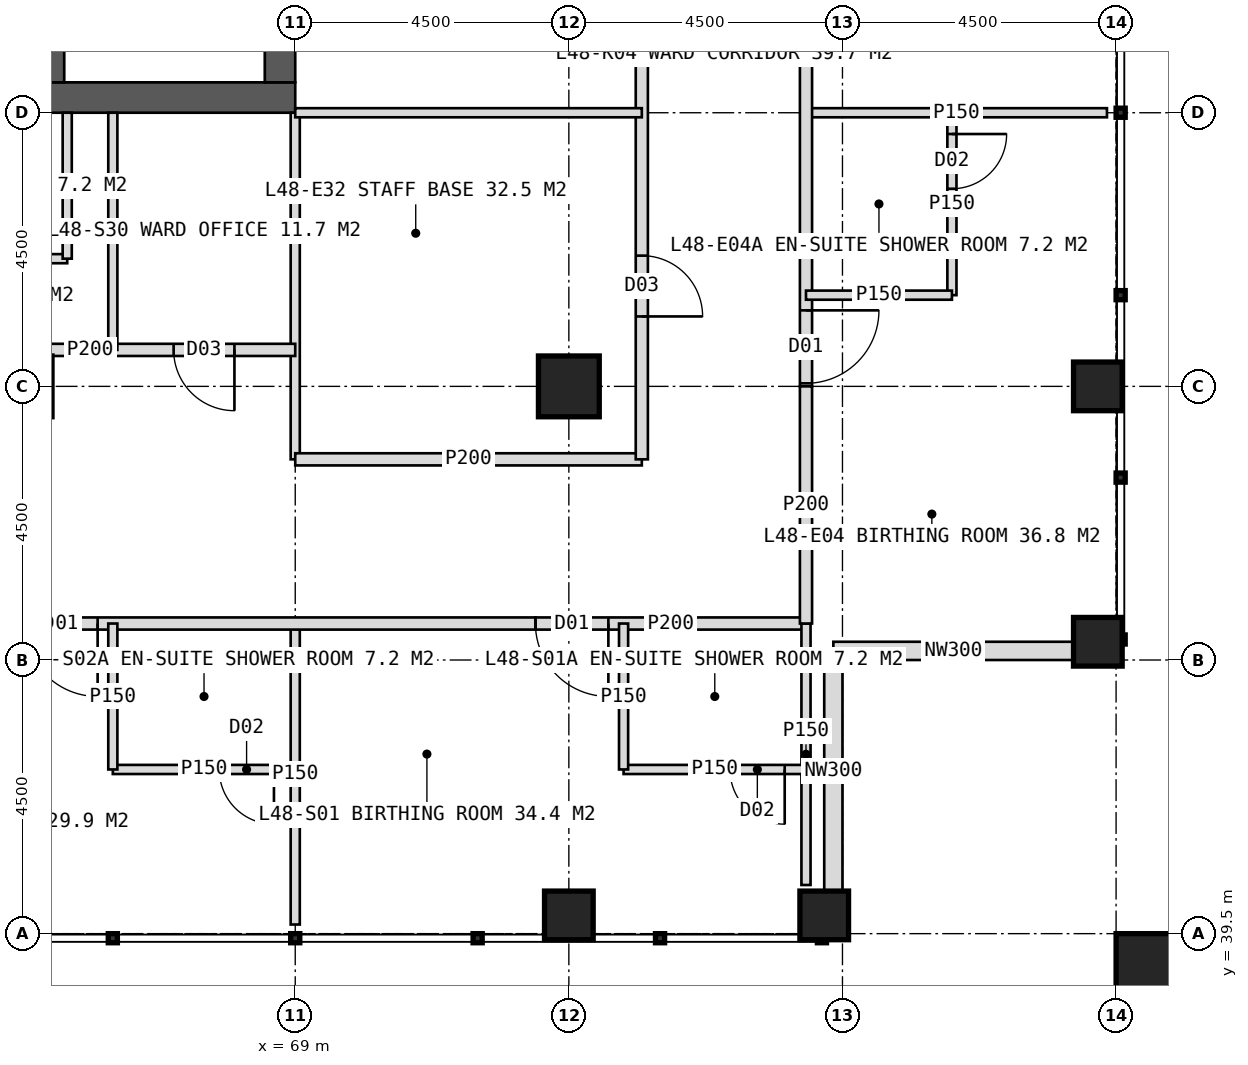
"""IFC4 building model, lengths in metres.
Left out: names, types, materials, properties, quantities, classifications, styles, units other than length and angle.
Written with IfcOpenShell. Run it as: python <this file> out.ifc"""

import sys

from ifc_helpers import new_model, si_unit, direction, frame, frame_2d, origin, origin_2d, place, context, subcontext, project, spatial, rectangle, hollow_rectangle, extrude, element, fill, save


model = new_model("IFC4")
c1 = context("Model", 3, precision=1e-05, world=origin(), true_north=direction((0.0, 1.0)))
c2 = subcontext(c1, "Body", "Model", "MODEL_VIEW")
j1 = project(units=[si_unit("LENGTHUNIT", "METRE"), si_unit("PLANEANGLEUNIT", "RADIAN")], contexts=[c1])
p1 = place(None, origin())
s1 = spatial("IfcSite", under=j1, at=p1, CompositionType="ELEMENT")
p2 = place(p1, origin())
s2 = spatial("IfcBuilding", under=s1, at=p2, CompositionType="ELEMENT")
p3 = place(p2, frame((0.0, 0.0, 201.0)))
s3 = spatial("IfcBuildingStorey", under=s2, at=p3, CompositionType="ELEMENT", Elevation=201.0)
p4 = place(p3, frame((51.0, 53.25, 0.0), z_axis=(0.0, 0.0, 1.0), x_axis=(1.0, 0.0, 0.0)))
e1 = element("IfcWall", 1, at=p4, inside=s3, PredefinedType="SHEAR", context=c2, shape_type="SweptSolid", body=[
    extrude(rectangle(XDim=18.0, YDim=0.5, at=frame_2d((9.0, 0.0))), origin(), (0.0, 0.0, 1.0), 4.0),
])
p5 = place(p4, frame((8.1, 0.0, 0.0)))
e2 = element("IfcOpeningElement", 2, at=p5, cuts=e1, PredefinedType="OPENING", context=c2, shape_type="SweptSolid", body=[
    extrude(rectangle(XDim=1.8, YDim=2.2, at=frame_2d((0.9, 1.1))), frame((0.0, 0.26, 0.0), z_axis=(0.0, -1.0, 0.0), x_axis=(1.0, 0.0, 0.0)), (0.0, 0.0, 1.0), 0.52),
])
p6 = place(p3, frame((68.75, 53.5, 0.0), z_axis=(0.0, 0.0, 1.0), x_axis=(0.0, 1.0, 0.0)))
e3 = element("IfcWall", 3, at=p6, inside=s3, PredefinedType="SHEAR", context=c2, shape_type="SweptSolid", body=[
    extrude(rectangle(XDim=17.0, YDim=0.5, at=frame_2d((8.5, 0.0))), origin(), (0.0, 0.0, 1.0), 4.0),
])
p7 = place(p6, frame((9.6, 0.0, 0.0)))
e4 = element("IfcOpeningElement", 4, at=p7, cuts=e3, PredefinedType="OPENING", context=c2, shape_type="SweptSolid", body=[
    extrude(rectangle(XDim=1.5, YDim=2.2, at=frame_2d((0.75, 1.1))), frame((0.0, 0.26, 0.0), z_axis=(0.0, -1.0, 0.0), x_axis=(1.0, 0.0, 0.0)), (0.0, 0.0, 1.0), 0.52),
])
p8 = place(p3, frame((65.05, 53.5, 0.0), z_axis=(0.0, 0.0, 1.0), x_axis=(0.0, 1.0, 0.0)))
e5 = element("IfcWall", 5, at=p8, inside=s3, PredefinedType="SHEAR", context=c2, shape_type="SweptSolid", body=[
    extrude(rectangle(XDim=17.0, YDim=0.3, at=frame_2d((8.5, 0.0))), origin(), (0.0, 0.0, 1.0), 4.0),
])
p9 = place(p3, frame((73.5, 48.5, 0.0), z_axis=(0.0, 0.0, 1.0), x_axis=(1.0, 0.0, 0.0)))
e6 = element("IfcColumn", 6, at=p9, inside=s3, PredefinedType="COLUMN", context=c2, shape_type="SweptSolid", body=[
    extrude(hollow_rectangle(XDim=1.0, YDim=1.0, WallThickness=0.1, at=origin_2d()), origin(), (0.0, 0.0, 1.0), 4.0),
])
for number, where, z_axis, x_axis in (
    (7, (82.2, 44.3, 0.0), (0.0, 0.0, 1.0), (1.0, 0.0, 0.0)),
    (8, (82.2, 48.5, 0.0), (0.0, 0.0, 1.0), (1.0, 0.0, 0.0)),
    (9, (73.5, 39.8, 0.0), (0.0, 0.0, 1.0), (1.0, 0.0, 0.0)),
    (10, (77.7, 39.8, 0.0), (0.0, 0.0, 1.0), (1.0, 0.0, 0.0)),
):
    element("IfcColumn", number, at=place(p3, frame(where, z_axis=z_axis, x_axis=x_axis)), inside=s3, PredefinedType="COLUMN", context=c2, shape_type="SweptSolid", body=[
        extrude(hollow_rectangle(XDim=0.8, YDim=0.8, WallThickness=0.08, at=origin_2d()), origin(), (0.0, 0.0, 1.0), 4.0),
    ])
p10 = place(p3, frame((83.1, 38.9, 0.0), z_axis=(0.0, 0.0, 1.0), x_axis=(1.0, 0.0, 0.0)))
e11 = element("IfcColumn", 11, at=p10, inside=s3, PredefinedType="COLUMN", context=c2, shape_type="SweptSolid", body=[
    extrude(hollow_rectangle(XDim=1.2, YDim=1.2, WallThickness=0.07, at=origin_2d()), origin(), (0.0, 0.0, 1.0), 4.0),
])
for number, where, z_axis, x_axis in (
    (12, (81.8, 44.15, 0.0), (0.0, 0.0, 1.0), (-1.0, 0.0, 0.0)),
    (13, (77.85, 44.15, 0.0), (0.0, 0.0, 1.0), (0.0, -1.0, 0.0)),
):
    element("IfcWall", number, at=place(p3, frame(where, z_axis=z_axis, x_axis=x_axis)), inside=s3, PredefinedType="ELEMENTEDWALL", context=c2, shape_type="SweptSolid", body=[
        extrude(rectangle(XDim=3.95, YDim=0.3, at=frame_2d((1.975, 0.0))), origin(), (0.0, 0.0, 1.0), 2.85),
    ])
p11 = place(p3, frame((69.0, 44.6, 0.0), z_axis=(0.0, 0.0, 1.0), x_axis=(0.0, -1.0, 0.0)))
e14 = element("IfcWall", 14, at=p11, inside=s3, PredefinedType="PARTITIONING", context=c2, shape_type="SweptSolid", body=[
    extrude(rectangle(XDim=4.95, YDim=0.15, at=frame_2d((2.475, 0.0))), origin(), (0.0, 0.0, 1.0), 3.75),
])
p12 = place(p3, frame((77.4, 44.6, 0.0), z_axis=(0.0, 0.0, 1.0), x_axis=(-1.0, 0.0, 0.0)))
e15 = element("IfcWall", 15, at=p12, inside=s3, PredefinedType="PARTITIONING", context=c2, shape_type="SweptSolid", body=[
    extrude(rectangle(XDim=4.45, YDim=0.2, at=frame_2d((2.225, 0.0))), origin(), (0.0, 0.0, 1.0), 2.85),
])
p13 = place(p12, frame((3.25, 0.0, 0.0)))
e16 = element("IfcOpeningElement", 16, at=p13, cuts=e15, PredefinedType="OPENING", context=c2, shape_type="SweptSolid", body=[
    extrude(rectangle(XDim=1.2, YDim=2.2, at=frame_2d((0.6, 1.1))), frame((0.0, 0.11, 0.0), z_axis=(0.0, -1.0, 0.0), x_axis=(1.0, 0.0, 0.0)), (0.0, 0.0, 1.0), 0.22),
])
p14 = place(p3, frame((72.95, 44.6, 0.0), z_axis=(0.0, 0.0, 1.0), x_axis=(-1.0, 0.0, 0.0)))
e17 = element("IfcWall", 17, at=p14, inside=s3, PredefinedType="PARTITIONING", context=c2, shape_type="SweptSolid", body=[
    extrude(rectangle(XDim=26.45, YDim=0.2, at=frame_2d((13.225, 0.0))), origin(), (0.0, 0.0, 1.0), 3.75),
])
p15 = place(p14, frame((7.2, 0.0, 0.0)))
e18 = element("IfcOpeningElement", 18, at=p15, cuts=e17, PredefinedType="OPENING", context=c2, shape_type="SweptSolid", body=[
    extrude(rectangle(XDim=1.2, YDim=2.2, at=frame_2d((0.6, 1.1))), frame((0.0, 0.11, 0.0), z_axis=(0.0, -1.0, 0.0), x_axis=(1.0, 0.0, 0.0)), (0.0, 0.0, 1.0), 0.22),
])
p16 = place(p14, frame((14.7, 0.0, 0.0)))
e19 = element("IfcOpeningElement", 19, at=p16, cuts=e17, PredefinedType="OPENING", context=c2, shape_type="SweptSolid", body=[
    extrude(rectangle(XDim=1.2, YDim=2.2, at=frame_2d((0.6, 1.1))), frame((0.0, 0.11, 0.0), z_axis=(0.0, -1.0, 0.0), x_axis=(1.0, 0.0, 0.0)), (0.0, 0.0, 1.0), 0.22),
])
p17 = place(p14, frame((22.2, 0.0, 0.0)))
e20 = element("IfcOpeningElement", 20, at=p17, cuts=e17, PredefinedType="OPENING", context=c2, shape_type="SweptSolid", body=[
    extrude(rectangle(XDim=1.2, YDim=2.2, at=frame_2d((0.6, 1.1))), frame((0.0, 0.11, 0.0), z_axis=(0.0, -1.0, 0.0), x_axis=(1.0, 0.0, 0.0)), (0.0, 0.0, 1.0), 0.22),
])
p18 = place(p3, frame((77.4, 44.6, 0.0), z_axis=(0.0, 0.0, 1.0), x_axis=(0.0, -1.0, 0.0)))
e21 = element("IfcWall", 21, at=p18, inside=s3, PredefinedType="PARTITIONING", context=c2, shape_type="SweptSolid", body=[
    extrude(rectangle(XDim=4.3, YDim=0.15, at=frame_2d((2.15, 0.0))), origin(), (0.0, 0.0, 1.0), 2.85),
])
p19 = place(p3, frame((77.4, 42.2, 0.0), z_axis=(0.0, 0.0, 1.0), x_axis=(-1.0, 0.0, 0.0)))
e22 = element("IfcWall", 22, at=p19, inside=s3, PredefinedType="PARTITIONING", context=c2, shape_type="SweptSolid", body=[
    extrude(rectangle(XDim=3.0, YDim=0.15, at=frame_2d((1.5, 0.0))), origin(), (0.0, 0.0, 1.0), 3.75),
])
p20 = place(p19, frame((0.35, 0.0, 0.0)))
e23 = element("IfcOpeningElement", 23, at=p20, cuts=e22, PredefinedType="OPENING", context=c2, shape_type="SweptSolid", body=[
    extrude(rectangle(XDim=0.9, YDim=2.1, at=frame_2d((0.45, 1.05))), frame((0.0, 0.085, 0.0), z_axis=(0.0, -1.0, 0.0), x_axis=(1.0, 0.0, 0.0)), (0.0, 0.0, 1.0), 0.17),
])
p21 = place(p3, frame((74.4, 44.6, 0.0), z_axis=(0.0, 0.0, 1.0), x_axis=(0.0, -1.0, 0.0)))
e24 = element("IfcWall", 24, at=p21, inside=s3, PredefinedType="PARTITIONING", context=c2, shape_type="SweptSolid", body=[
    extrude(rectangle(XDim=2.4, YDim=0.15, at=frame_2d((1.2, 0.0))), origin(), (0.0, 0.0, 1.0), 3.75),
])
p22 = place(p3, frame((69.0, 42.2, 0.0), z_axis=(0.0, 0.0, 1.0), x_axis=(-1.0, 0.0, 0.0)))
e25 = element("IfcWall", 25, at=p22, inside=s3, PredefinedType="PARTITIONING", context=c2, shape_type="SweptSolid", body=[
    extrude(rectangle(XDim=3.0, YDim=0.15, at=frame_2d((1.5, 0.0))), origin(), (0.0, 0.0, 1.0), 3.75),
])
p23 = place(p22, frame((0.35, 0.0, 0.0)))
e26 = element("IfcOpeningElement", 26, at=p23, cuts=e25, PredefinedType="OPENING", context=c2, shape_type="SweptSolid", body=[
    extrude(rectangle(XDim=0.9, YDim=2.1, at=frame_2d((0.45, 1.05))), frame((0.0, 0.085, 0.0), z_axis=(0.0, -1.0, 0.0), x_axis=(1.0, 0.0, 0.0)), (0.0, 0.0, 1.0), 0.17),
])
p24 = place(p3, frame((66.0, 44.6, 0.0), z_axis=(0.0, 0.0, 1.0), x_axis=(0.0, -1.0, 0.0)))
e27 = element("IfcWall", 27, at=p24, inside=s3, PredefinedType="PARTITIONING", context=c2, shape_type="SweptSolid", body=[
    extrude(rectangle(XDim=2.4, YDim=0.15, at=frame_2d((1.2, 0.0))), origin(), (0.0, 0.0, 1.0), 3.75),
])
p25 = place(p3, frame((69.0, 53.0, 0.0), z_axis=(0.0, 0.0, 1.0), x_axis=(0.0, -1.0, 0.0)))
e28 = element("IfcWall", 28, at=p25, inside=s3, PredefinedType="PARTITIONING", context=c2, shape_type="SweptSolid", body=[
    extrude(rectangle(XDim=5.7, YDim=0.15, at=frame_2d((2.85, 0.0))), origin(), (0.0, 0.0, 1.0), 3.75),
])
p26 = place(p3, frame((74.7, 47.3, 0.0), z_axis=(0.0, 0.0, 1.0), x_axis=(-1.0, 0.0, 0.0)))
e29 = element("IfcWall", 29, at=p26, inside=s3, PredefinedType="PARTITIONING", context=c2, shape_type="SweptSolid", body=[
    extrude(rectangle(XDim=5.7, YDim=0.2, at=frame_2d((2.85, 0.0))), origin(), (0.0, 0.0, 1.0), 3.75),
])
p27 = place(p3, frame((69.0, 49.1, 0.0), z_axis=(0.0, 0.0, 1.0), x_axis=(-1.0, 0.0, 0.0)))
e30 = element("IfcWall", 30, at=p27, inside=s3, PredefinedType="PARTITIONING", context=c2, shape_type="SweptSolid", body=[
    extrude(rectangle(XDim=6.75, YDim=0.2, at=frame_2d((3.375, 0.0))), origin(), (0.0, 0.0, 1.0), 3.75),
])
p28 = place(p27, frame((1.0, 0.0, 0.0)))
e31 = element("IfcOpeningElement", 31, at=p28, cuts=e30, PredefinedType="OPENING", context=c2, shape_type="SweptSolid", body=[
    extrude(rectangle(XDim=1.0, YDim=2.1, at=frame_2d((0.5, 1.05))), frame((0.0, 0.11, 0.0), z_axis=(0.0, -1.0, 0.0), x_axis=(1.0, 0.0, 0.0)), (0.0, 0.0, 1.0), 0.22),
])
p29 = place(p27, frame((5.425, 0.0, 0.0)))
e32 = element("IfcOpeningElement", 32, at=p29, cuts=e30, PredefinedType="OPENING", context=c2, shape_type="SweptSolid", body=[
    extrude(rectangle(XDim=1.0, YDim=2.1, at=frame_2d((0.5, 1.05))), frame((0.0, 0.11, 0.0), z_axis=(0.0, -1.0, 0.0), x_axis=(1.0, 0.0, 0.0)), (0.0, 0.0, 1.0), 0.22),
])
p30 = place(p3, frame((66.0, 53.0, 0.0), z_axis=(0.0, 0.0, 1.0), x_axis=(0.0, -1.0, 0.0)))
e33 = element("IfcWall", 33, at=p30, inside=s3, PredefinedType="PARTITIONING", context=c2, shape_type="SweptSolid", body=[
    extrude(rectangle(XDim=3.9, YDim=0.15, at=frame_2d((1.95, 0.0))), origin(), (0.0, 0.0, 1.0), 3.75),
])
p31 = place(p3, frame((65.25, 50.6, 0.0), z_axis=(0.0, 0.0, 1.0), x_axis=(-1.0, 0.0, 0.0)))
e34 = element("IfcWall", 34, at=p31, inside=s3, PredefinedType="PARTITIONING", context=c2, shape_type="SweptSolid", body=[
    extrude(rectangle(XDim=3.0, YDim=0.15, at=frame_2d((1.5, 0.0))), origin(), (0.0, 0.0, 1.0), 3.75),
])
p32 = place(p3, frame((65.25, 53.0, 0.0), z_axis=(0.0, 0.0, 1.0), x_axis=(0.0, -1.0, 0.0)))
e35 = element("IfcWall", 35, at=p32, inside=s3, PredefinedType="PARTITIONING", context=c2, shape_type="SweptSolid", body=[
    extrude(rectangle(XDim=2.4, YDim=0.15, at=frame_2d((1.2, 0.0))), origin(), (0.0, 0.0, 1.0), 3.75),
])
p33 = place(p3, frame((77.4, 53.0, 0.0), z_axis=(0.0, 0.0, 1.0), x_axis=(1.0, 0.0, 0.0)))
e36 = element("IfcWall", 36, at=p33, inside=s3, PredefinedType="PARTITIONING", context=c2, shape_type="SweptSolid", body=[
    extrude(rectangle(XDim=4.95, YDim=0.15, at=frame_2d((2.475, 0.0))), origin(), (0.0, 0.0, 1.0), 3.75),
])
p34 = place(p3, frame((77.4, 74.95, 0.0), z_axis=(0.0, 0.0, 1.0), x_axis=(0.0, -1.0, 0.0)))
e37 = element("IfcWall", 37, at=p34, inside=s3, PredefinedType="PARTITIONING", context=c2, shape_type="SweptSolid", body=[
    extrude(rectangle(XDim=26.45, YDim=0.2, at=frame_2d((13.225, 0.0))), origin(), (0.0, 0.0, 1.0), 3.75),
])
p35 = place(p34, frame((7.2, 0.0, 0.0)))
e38 = element("IfcOpeningElement", 38, at=p35, cuts=e37, PredefinedType="OPENING", context=c2, shape_type="SweptSolid", body=[
    extrude(rectangle(XDim=1.2, YDim=2.2, at=frame_2d((0.6, 1.1))), frame((0.0, 0.11, 0.0), z_axis=(0.0, -1.0, 0.0), x_axis=(1.0, 0.0, 0.0)), (0.0, 0.0, 1.0), 0.22),
])
p36 = place(p34, frame((16.2, 0.0, 0.0)))
e39 = element("IfcOpeningElement", 39, at=p36, cuts=e37, PredefinedType="OPENING", context=c2, shape_type="SweptSolid", body=[
    extrude(rectangle(XDim=1.2, YDim=2.2, at=frame_2d((0.6, 1.1))), frame((0.0, 0.11, 0.0), z_axis=(0.0, -1.0, 0.0), x_axis=(1.0, 0.0, 0.0)), (0.0, 0.0, 1.0), 0.22),
])
p37 = place(p34, frame((25.2, 0.0, 0.0)))
e40 = element("IfcOpeningElement", 40, at=p37, cuts=e37, PredefinedType="OPENING", context=c2, shape_type="SweptSolid", body=[
    extrude(rectangle(XDim=1.2, YDim=2.2, at=frame_2d((0.6, 1.1))), frame((0.0, 0.11, 0.0), z_axis=(0.0, -1.0, 0.0), x_axis=(1.0, 0.0, 0.0)), (0.0, 0.0, 1.0), 0.22),
])
p38 = place(p3, frame((77.4, 48.5, 0.0), z_axis=(0.0, 0.0, 1.0), x_axis=(0.0, -1.0, 0.0)))
e41 = element("IfcWall", 41, at=p38, inside=s3, PredefinedType="PARTITIONING", context=c2, shape_type="SweptSolid", body=[
    extrude(rectangle(XDim=3.9, YDim=0.2, at=frame_2d((1.95, 0.0))), origin(), (0.0, 0.0, 1.0), 2.85),
])
p39 = place(p3, frame((79.8, 53.0, 0.0), z_axis=(0.0, 0.0, 1.0), x_axis=(0.0, -1.0, 0.0)))
e42 = element("IfcWall", 42, at=p39, inside=s3, PredefinedType="PARTITIONING", context=c2, shape_type="SweptSolid", body=[
    extrude(rectangle(XDim=3.0, YDim=0.15, at=frame_2d((1.5, 0.0))), origin(), (0.0, 0.0, 1.0), 3.75),
])
p40 = place(p39, frame((0.35, 0.0, 0.0)))
e43 = element("IfcOpeningElement", 43, at=p40, cuts=e42, PredefinedType="OPENING", context=c2, shape_type="SweptSolid", body=[
    extrude(rectangle(XDim=0.9, YDim=2.1, at=frame_2d((0.45, 1.05))), frame((0.0, 0.085, 0.0), z_axis=(0.0, -1.0, 0.0), x_axis=(1.0, 0.0, 0.0)), (0.0, 0.0, 1.0), 0.17),
])
p41 = place(p3, frame((77.4, 50.0, 0.0), z_axis=(0.0, 0.0, 1.0), x_axis=(1.0, 0.0, 0.0)))
e44 = element("IfcWall", 44, at=p41, inside=s3, PredefinedType="PARTITIONING", context=c2, shape_type="SweptSolid", body=[
    extrude(rectangle(XDim=2.4, YDim=0.15, at=frame_2d((1.2, 0.0))), origin(), (0.0, 0.0, 1.0), 3.75),
])
p42 = place(p3, frame((74.7, 62.0, 0.0), z_axis=(0.0, 0.0, 1.0), x_axis=(0.0, -1.0, 0.0)))
e45 = element("IfcWall", 45, at=p42, inside=s3, PredefinedType="PARTITIONING", context=c2, shape_type="SweptSolid", body=[
    extrude(rectangle(XDim=14.7, YDim=0.2, at=frame_2d((7.35, 0.0))), origin(), (0.0, 0.0, 1.0), 3.75),
])
p43 = place(p42, frame((1.45, 0.0, 0.0)))
e46 = element("IfcOpeningElement", 46, at=p43, cuts=e45, PredefinedType="OPENING", context=c2, shape_type="SweptSolid", body=[
    extrude(rectangle(XDim=1.0, YDim=2.1, at=frame_2d((0.5, 1.05))), frame((0.0, 0.11, 0.0), z_axis=(0.0, -1.0, 0.0), x_axis=(1.0, 0.0, 0.0)), (0.0, 0.0, 1.0), 0.22),
])
p44 = place(p42, frame((11.35, 0.0, 0.0)))
e47 = element("IfcOpeningElement", 47, at=p44, cuts=e45, PredefinedType="OPENING", context=c2, shape_type="SweptSolid", body=[
    extrude(rectangle(XDim=1.0, YDim=2.1, at=frame_2d((0.5, 1.05))), frame((0.0, 0.11, 0.0), z_axis=(0.0, -1.0, 0.0), x_axis=(1.0, 0.0, 0.0)), (0.0, 0.0, 1.0), 0.22),
])
p45 = place(p3, frame((69.0, 53.0, 0.0), z_axis=(0.0, 0.0, 1.0), x_axis=(1.0, 0.0, 0.0)))
e48 = element("IfcWall", 48, at=p45, inside=s3, PredefinedType="PARTITIONING", context=c2, shape_type="SweptSolid", body=[
    extrude(rectangle(XDim=5.7, YDim=0.15, at=frame_2d((2.85, 0.0))), origin(), (0.0, 0.0, 1.0), 3.75),
])
p46 = place(p13, origin())
e49 = element("IfcDoor", 49, at=p46, inside=s3, OperationType="SINGLE_SWING_LEFT", PredefinedType="DOOR", context=c2, shape_type="SweptSolid", body=[
    extrude(rectangle(XDim=1.2, YDim=2.2, at=frame_2d((0.6, 1.1))), frame((0.0, 0.025, 0.0), z_axis=(0.0, -1.0, 0.0), x_axis=(1.0, 0.0, 0.0)), (0.0, 0.0, 1.0), 0.05),
])
fill(e16, e49)
p47 = place(p20, origin())
e50 = element("IfcDoor", 50, at=p47, inside=s3, OperationType="SINGLE_SWING_LEFT", PredefinedType="DOOR", context=c2, shape_type="SweptSolid", body=[
    extrude(rectangle(XDim=0.9, YDim=2.1, at=frame_2d((0.45, 1.05))), frame((0.0, 0.025, 0.0), z_axis=(0.0, -1.0, 0.0), x_axis=(1.0, 0.0, 0.0)), (0.0, 0.0, 1.0), 0.05),
])
fill(e23, e50)
p48 = place(p15, origin())
e51 = element("IfcDoor", 51, at=p48, inside=s3, OperationType="SINGLE_SWING_LEFT", PredefinedType="DOOR", context=c2, shape_type="SweptSolid", body=[
    extrude(rectangle(XDim=1.2, YDim=2.2, at=frame_2d((0.6, 1.1))), frame((0.0, 0.025, 0.0), z_axis=(0.0, -1.0, 0.0), x_axis=(1.0, 0.0, 0.0)), (0.0, 0.0, 1.0), 0.05),
])
fill(e18, e51)
p49 = place(p23, origin())
e52 = element("IfcDoor", 52, at=p49, inside=s3, OperationType="SINGLE_SWING_LEFT", PredefinedType="DOOR", context=c2, shape_type="SweptSolid", body=[
    extrude(rectangle(XDim=0.9, YDim=2.1, at=frame_2d((0.45, 1.05))), frame((0.0, 0.025, 0.0), z_axis=(0.0, -1.0, 0.0), x_axis=(1.0, 0.0, 0.0)), (0.0, 0.0, 1.0), 0.05),
])
fill(e26, e52)
p50 = place(p28, origin())
e53 = element("IfcDoor", 53, at=p50, inside=s3, OperationType="SINGLE_SWING_LEFT", PredefinedType="DOOR", context=c2, shape_type="SweptSolid", body=[
    extrude(rectangle(XDim=1.0, YDim=2.1, at=frame_2d((0.5, 1.05))), frame((0.0, 0.025, 0.0), z_axis=(0.0, -1.0, 0.0), x_axis=(1.0, 0.0, 0.0)), (0.0, 0.0, 1.0), 0.05),
])
fill(e31, e53)
p51 = place(p37, origin())
e54 = element("IfcDoor", 54, at=p51, inside=s3, OperationType="SINGLE_SWING_LEFT", PredefinedType="DOOR", context=c2, shape_type="SweptSolid", body=[
    extrude(rectangle(XDim=1.2, YDim=2.2, at=frame_2d((0.6, 1.1))), frame((0.0, 0.025, 0.0), z_axis=(0.0, -1.0, 0.0), x_axis=(1.0, 0.0, 0.0)), (0.0, 0.0, 1.0), 0.05),
])
fill(e40, e54)
p52 = place(p40, origin())
e55 = element("IfcDoor", 55, at=p52, inside=s3, OperationType="SINGLE_SWING_LEFT", PredefinedType="DOOR", context=c2, shape_type="SweptSolid", body=[
    extrude(rectangle(XDim=0.9, YDim=2.1, at=frame_2d((0.45, 1.05))), frame((0.0, 0.025, 0.0), z_axis=(0.0, -1.0, 0.0), x_axis=(1.0, 0.0, 0.0)), (0.0, 0.0, 1.0), 0.05),
])
fill(e43, e55)
p53 = place(p44, origin())
e56 = element("IfcDoor", 56, at=p53, inside=s3, OperationType="SINGLE_SWING_RIGHT", PredefinedType="DOOR", context=c2, shape_type="SweptSolid", body=[
    extrude(rectangle(XDim=1.0, YDim=2.1, at=frame_2d((0.5, 1.05))), frame((0.0, 0.025, 0.0), z_axis=(0.0, -1.0, 0.0), x_axis=(1.0, 0.0, 0.0)), (0.0, 0.0, 1.0), 0.05),
])
fill(e47, e56)
save(model, sys.argv[1])
